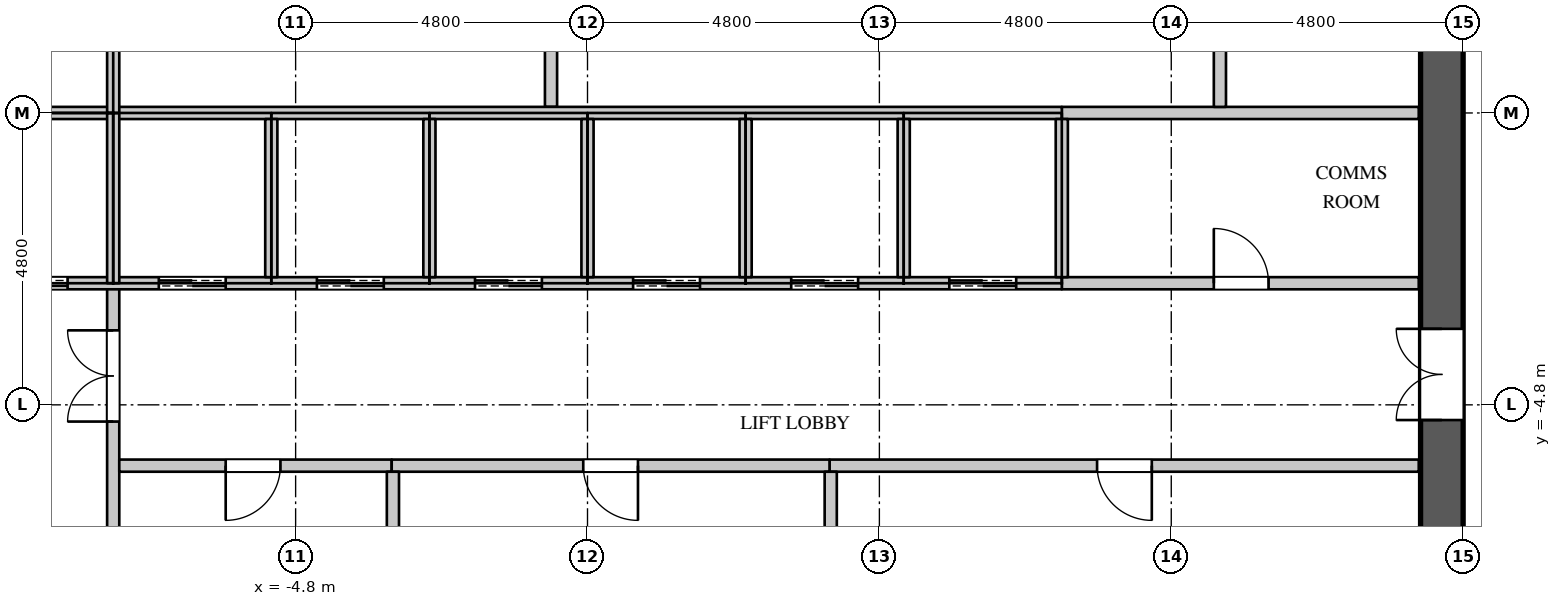
"""IFC4 building model, lengths in metres.
Left out: names, types, materials, properties, quantities, classifications, styles, units other than length and angle.
Written with IfcOpenShell. Run it as: python <this file> out.ifc"""

import sys

from ifc_helpers import new_model, si_unit, direction, frame, frame_2d, origin, place, context, subcontext, project, spatial, rectangle, extrude, element, fill, save


model = new_model("IFC4")
c1 = context("Model", 3, precision=1e-05, world=origin(), true_north=direction((0.0, 1.0)))
c2 = subcontext(c1, "Body", "Model", "MODEL_VIEW")
j1 = project(units=[si_unit("LENGTHUNIT", "METRE"), si_unit("PLANEANGLEUNIT", "RADIAN")], contexts=[c1])
p1 = place(None, origin())
s1 = spatial("IfcSite", under=j1, at=p1, CompositionType="ELEMENT")
p2 = place(p1, origin())
s2 = spatial("IfcBuilding", under=s1, at=p2, CompositionType="ELEMENT")
p3 = place(p2, frame((0.0, 0.0, 200.1)))
s3 = spatial("IfcBuildingStorey", under=s2, at=p3, CompositionType="ELEMENT", Elevation=200.1)
p4 = place(p3, frame((14.05, -11.3, 0.0), z_axis=(0.0, 0.0, 1.0), x_axis=(0.0, 1.0, 0.0)))
e1 = element("IfcWall", 1, at=p4, inside=s3, PredefinedType="SHEAR", context=c2, shape_type="SweptSolid", body=[
    extrude(rectangle(XDim=22.6, YDim=0.7, at=frame_2d((11.3, 0.0))), origin(), (0.0, 0.0, 1.0), 4.2),
])
p5 = place(p4, frame((20.35, 0.0, 0.0)))
e2 = element("IfcOpeningElement", 2, at=p5, cuts=e1, PredefinedType="OPENING", context=c2, shape_type="SweptSolid", body=[
    extrude(rectangle(XDim=1.1, YDim=2.2, at=frame_2d((0.55, 1.1))), frame((0.0, 0.36, 0.0), z_axis=(0.0, -1.0, 0.0), x_axis=(1.0, 0.0, 0.0)), (0.0, 0.0, 1.0), 0.72),
])
p6 = place(p4, frame((1.15, 0.0, 0.0)))
e3 = element("IfcOpeningElement", 3, at=p6, cuts=e1, PredefinedType="OPENING", context=c2, shape_type="SweptSolid", body=[
    extrude(rectangle(XDim=1.1, YDim=2.2, at=frame_2d((0.55, 1.1))), frame((0.0, 0.36, 0.0), z_axis=(0.0, -1.0, 0.0), x_axis=(1.0, 0.0, 0.0)), (0.0, 0.0, 1.0), 0.72),
])
p7 = place(p4, frame((14.85, 0.0, 0.0)))
e4 = element("IfcOpeningElement", 4, at=p7, cuts=e1, PredefinedType="OPENING", context=c2, shape_type="SweptSolid", body=[
    extrude(rectangle(XDim=1.5, YDim=2.4, at=frame_2d((0.75, 1.2))), frame((0.0, 0.36, 0.0), z_axis=(0.0, -1.0, 0.0), x_axis=(1.0, 0.0, 0.0)), (0.0, 0.0, 1.0), 0.72),
])
p8 = place(p4, frame((6.25, 0.0, 0.0)))
e5 = element("IfcOpeningElement", 5, at=p8, cuts=e1, PredefinedType="OPENING", context=c2, shape_type="SweptSolid", body=[
    extrude(rectangle(XDim=1.5, YDim=2.4, at=frame_2d((0.75, 1.2))), frame((0.0, 0.36, 0.0), z_axis=(0.0, -1.0, 0.0), x_axis=(1.0, 0.0, 0.0)), (0.0, 0.0, 1.0), 0.72),
])
p9 = place(p3, frame((-7.8, -8.075, 0.0), z_axis=(0.0, 0.0, 1.0), x_axis=(0.0, 1.0, 0.0)))
e6 = element("IfcWall", 6, at=p9, inside=s3, PredefinedType="PARTITIONING", context=c2, shape_type="SweptSolid", body=[
    extrude(rectangle(XDim=5.275, YDim=0.2, at=frame_2d((2.637, 0.0))), origin(), (0.0, 0.0, 1.0), 3.798),
])
p10 = place(p9, frame((3.0, 0.0, 0.0)))
e7 = element("IfcOpeningElement", 7, at=p10, cuts=e6, PredefinedType="OPENING", context=c2, shape_type="SweptSolid", body=[
    extrude(rectangle(XDim=1.5, YDim=2.4, at=frame_2d((0.75, 1.2))), frame((0.0, 0.11, 0.0), z_axis=(0.0, -1.0, 0.0), x_axis=(1.0, 0.0, 0.0)), (0.0, 0.0, 1.0), 0.22),
])
p11 = place(p3, frame((-7.7, -5.8, 0.0), z_axis=(0.0, 0.0, 1.0), x_axis=(1.0, 0.0, 0.0)))
e8 = element("IfcWall", 8, at=p11, inside=s3, PredefinedType="PARTITIONING", context=c2, shape_type="SweptSolid", body=[
    extrude(rectangle(XDim=4.48, YDim=0.2, at=frame_2d((2.24, 0.0))), origin(), (0.0, 0.0, 1.0), 3.798),
])
p12 = place(p11, frame((1.75, 0.0, 0.0)))
e9 = element("IfcOpeningElement", 9, at=p12, cuts=e8, PredefinedType="OPENING", context=c2, shape_type="SweptSolid", body=[
    extrude(rectangle(XDim=0.9, YDim=2.2, at=frame_2d((0.45, 1.1))), frame((0.0, 0.11, 0.0), z_axis=(0.0, -1.0, 0.0), x_axis=(1.0, 0.0, 0.0)), (0.0, 0.0, 1.0), 0.22),
])
p13 = place(p3, frame((3.98, -5.8, 0.0), z_axis=(0.0, 0.0, 1.0), x_axis=(1.0, 0.0, 0.0)))
e10 = element("IfcWall", 10, at=p13, inside=s3, PredefinedType="PARTITIONING", context=c2, shape_type="SweptSolid", body=[
    extrude(rectangle(XDim=9.69, YDim=0.2, at=frame_2d((4.845, 0.0))), origin(), (0.0, 0.0, 1.0), 3.798),
])
p14 = place(p13, frame((4.4, 0.0, 0.0)))
e11 = element("IfcOpeningElement", 11, at=p14, cuts=e10, PredefinedType="OPENING", context=c2, shape_type="SweptSolid", body=[
    extrude(rectangle(XDim=0.9, YDim=2.2, at=frame_2d((0.45, 1.1))), frame((0.0, 0.11, 0.0), z_axis=(0.0, -1.0, 0.0), x_axis=(1.0, 0.0, 0.0)), (0.0, 0.0, 1.0), 0.22),
])
p15 = place(p3, frame((-3.22, -5.8, 0.0), z_axis=(0.0, 0.0, 1.0), x_axis=(1.0, 0.0, 0.0)))
e12 = element("IfcWall", 12, at=p15, inside=s3, PredefinedType="PARTITIONING", context=c2, shape_type="SweptSolid", body=[
    extrude(rectangle(XDim=7.2, YDim=0.2, at=frame_2d((3.6, 0.0))), origin(), (0.0, 0.0, 1.0), 3.798),
])
p16 = place(p15, frame((3.15, 0.0, 0.0)))
e13 = element("IfcOpeningElement", 13, at=p16, cuts=e12, PredefinedType="OPENING", context=c2, shape_type="SweptSolid", body=[
    extrude(rectangle(XDim=0.9, YDim=2.2, at=frame_2d((0.45, 1.1))), frame((0.0, 0.11, 0.0), z_axis=(0.0, -1.0, 0.0), x_axis=(1.0, 0.0, 0.0)), (0.0, 0.0, 1.0), 0.22),
])
p17 = place(p3, frame((-3.2, -11.27, 0.0), z_axis=(0.0, 0.0, 1.0), x_axis=(0.0, 1.0, 0.0)))
e14 = element("IfcWall", 14, at=p17, inside=s3, PredefinedType="PARTITIONING", context=c2, shape_type="SweptSolid", body=[
    extrude(rectangle(XDim=5.37, YDim=0.2, at=frame_2d((2.685, 0.0))), origin(), (0.0, 0.0, 1.0), 3.798),
])
p18 = place(p3, frame((-0.6, 0.1, 0.0), z_axis=(0.0, 0.0, 1.0), x_axis=(0.0, 1.0, 0.0)))
e15 = element("IfcWall", 15, at=p18, inside=s3, PredefinedType="PARTITIONING", context=c2, shape_type="SweptSolid", body=[
    extrude(rectangle(XDim=2.6, YDim=0.2, at=frame_2d((1.3, 0.0))), origin(), (0.0, 0.0, 1.0), 3.798),
])
p19 = place(p3, frame((4.0, -11.27, 0.0), z_axis=(0.0, 0.0, 1.0), x_axis=(0.0, 1.0, 0.0)))
e16 = element("IfcWall", 16, at=p19, inside=s3, PredefinedType="PARTITIONING", context=c2, shape_type="SweptSolid", body=[
    extrude(rectangle(XDim=5.37, YDim=0.2, at=frame_2d((2.685, 0.0))), origin(), (0.0, 0.0, 1.0), 3.798),
])
p20 = place(p3, frame((7.8, -2.8, 0.0), z_axis=(0.0, 0.0, 1.0), x_axis=(1.0, 0.0, 0.0)))
e17 = element("IfcWall", 17, at=p20, inside=s3, PredefinedType="PARTITIONING", context=c2, shape_type="SweptSolid", body=[
    extrude(rectangle(XDim=5.87, YDim=0.2, at=frame_2d((2.935, 0.0))), origin(), (0.0, 0.0, 1.0), 3.798),
])
p21 = place(p20, frame((2.5, 0.0, 0.0)))
e18 = element("IfcOpeningElement", 18, at=p21, cuts=e17, PredefinedType="OPENING", context=c2, shape_type="SweptSolid", body=[
    extrude(rectangle(XDim=0.9, YDim=2.2, at=frame_2d((0.45, 1.1))), frame((0.0, 0.11, 0.0), z_axis=(0.0, -1.0, 0.0), x_axis=(1.0, 0.0, 0.0)), (0.0, 0.0, 1.0), 0.22),
])
p22 = place(p3, frame((7.8, 0.0, 0.0), z_axis=(0.0, 0.0, 1.0), x_axis=(1.0, 0.0, 0.0)))
e19 = element("IfcWall", 19, at=p22, inside=s3, PredefinedType="PARTITIONING", context=c2, shape_type="SweptSolid", body=[
    extrude(rectangle(XDim=5.87, YDim=0.2, at=frame_2d((2.935, 0.0))), origin(), (0.0, 0.0, 1.0), 3.798),
])
p23 = place(p3, frame((10.4, 0.1, 0.0), z_axis=(0.0, 0.0, 1.0), x_axis=(0.0, 1.0, 0.0)))
e20 = element("IfcWall", 20, at=p23, inside=s3, PredefinedType="PARTITIONING", context=c2, shape_type="SweptSolid", body=[
    extrude(rectangle(XDim=2.6, YDim=0.2, at=frame_2d((1.3, 0.0))), origin(), (0.0, 0.0, 1.0), 3.798),
])
p24 = place(p3, frame((-13.67, 0.0, 0.0), z_axis=(0.0, 0.0, 1.0), x_axis=(1.0, 0.0, 0.0)))
e21 = element("IfcWall", 21, at=p24, inside=s3, PredefinedType="PARTITIONING", context=c2, shape_type="SweptSolid", body=[
    extrude(rectangle(XDim=21.47, YDim=0.2, at=frame_2d((10.735, 0.0))), origin(), (0.0, 0.0, 1.0), 3.798),
])
p25 = place(p3, frame((-10.4, -2.8, 0.0), z_axis=(0.0, 0.0, 1.0), x_axis=(1.0, 0.0, 0.0)))
e22 = element("IfcWall", 22, at=p25, inside=s3, PredefinedType="PARTITIONING", context=c2, shape_type="SweptSolid", body=[
    extrude(rectangle(XDim=18.2, YDim=0.2, at=frame_2d((9.1, 0.0))), origin(), (0.0, 0.0, 1.0), 3.798),
])
p26 = place(p25, frame((0.75, 0.0, 0.0)))
e23 = element("IfcOpeningElement", 23, at=p26, cuts=e22, PredefinedType="OPENING", context=c2, shape_type="SweptSolid", body=[
    extrude(rectangle(XDim=1.1, YDim=2.2, at=frame_2d((0.55, 1.1))), frame((0.0, 0.11, 0.0), z_axis=(0.0, -1.0, 0.0), x_axis=(1.0, 0.0, 0.0)), (0.0, 0.0, 1.0), 0.22),
])
p27 = place(p25, frame((3.35, 0.0, 0.0)))
e24 = element("IfcOpeningElement", 24, at=p27, cuts=e22, PredefinedType="OPENING", context=c2, shape_type="SweptSolid", body=[
    extrude(rectangle(XDim=1.1, YDim=2.2, at=frame_2d((0.55, 1.1))), frame((0.0, 0.11, 0.0), z_axis=(0.0, -1.0, 0.0), x_axis=(1.0, 0.0, 0.0)), (0.0, 0.0, 1.0), 0.22),
])
p28 = place(p25, frame((5.95, 0.0, 0.0)))
e25 = element("IfcOpeningElement", 25, at=p28, cuts=e22, PredefinedType="OPENING", context=c2, shape_type="SweptSolid", body=[
    extrude(rectangle(XDim=1.1, YDim=2.2, at=frame_2d((0.55, 1.1))), frame((0.0, 0.11, 0.0), z_axis=(0.0, -1.0, 0.0), x_axis=(1.0, 0.0, 0.0)), (0.0, 0.0, 1.0), 0.22),
])
p29 = place(p25, frame((8.55, 0.0, 0.0)))
e26 = element("IfcOpeningElement", 26, at=p29, cuts=e22, PredefinedType="OPENING", context=c2, shape_type="SweptSolid", body=[
    extrude(rectangle(XDim=1.1, YDim=2.2, at=frame_2d((0.55, 1.1))), frame((0.0, 0.11, 0.0), z_axis=(0.0, -1.0, 0.0), x_axis=(1.0, 0.0, 0.0)), (0.0, 0.0, 1.0), 0.22),
])
p30 = place(p25, frame((11.15, 0.0, 0.0)))
e27 = element("IfcOpeningElement", 27, at=p30, cuts=e22, PredefinedType="OPENING", context=c2, shape_type="SweptSolid", body=[
    extrude(rectangle(XDim=1.1, YDim=2.2, at=frame_2d((0.55, 1.1))), frame((0.0, 0.11, 0.0), z_axis=(0.0, -1.0, 0.0), x_axis=(1.0, 0.0, 0.0)), (0.0, 0.0, 1.0), 0.22),
])
p31 = place(p25, frame((13.75, 0.0, 0.0)))
e28 = element("IfcOpeningElement", 28, at=p31, cuts=e22, PredefinedType="OPENING", context=c2, shape_type="SweptSolid", body=[
    extrude(rectangle(XDim=1.1, YDim=2.2, at=frame_2d((0.55, 1.1))), frame((0.0, 0.11, 0.0), z_axis=(0.0, -1.0, 0.0), x_axis=(1.0, 0.0, 0.0)), (0.0, 0.0, 1.0), 0.22),
])
p32 = place(p25, frame((16.35, 0.0, 0.0)))
e29 = element("IfcOpeningElement", 29, at=p32, cuts=e22, PredefinedType="OPENING", context=c2, shape_type="SweptSolid", body=[
    extrude(rectangle(XDim=1.1, YDim=2.2, at=frame_2d((0.55, 1.1))), frame((0.0, 0.11, 0.0), z_axis=(0.0, -1.0, 0.0), x_axis=(1.0, 0.0, 0.0)), (0.0, 0.0, 1.0), 0.22),
])
for number, where, z_axis, x_axis in (
    (30, (-7.8, -2.8, 0.0), (0.0, 0.0, 1.0), (0.0, 1.0, 0.0)),
    (31, (-7.8, 0.0, 0.0), (0.0, 0.0, 1.0), (0.0, 1.0, 0.0)),
):
    element("IfcWall", number, at=place(p3, frame(where, z_axis=z_axis, x_axis=x_axis)), inside=s3, PredefinedType="PARTITIONING", context=c2, shape_type="SweptSolid", body=[
        extrude(rectangle(XDim=2.8, YDim=0.2, at=frame_2d((1.4, 0.0))), origin(), (0.0, 0.0, 1.0), 3.798),
    ])
for number, where, z_axis, x_axis in (
    (32, (-5.2, -2.7, 0.0), (0.0, 0.0, 1.0), (0.0, 1.0, 0.0)),
    (33, (-2.6, -2.7, 0.0), (0.0, 0.0, 1.0), (0.0, 1.0, 0.0)),
    (34, (0.0, -2.7, 0.0), (0.0, 0.0, 1.0), (0.0, 1.0, 0.0)),
    (35, (2.6, -2.7, 0.0), (0.0, 0.0, 1.0), (0.0, 1.0, 0.0)),
    (36, (5.2, -2.7, 0.0), (0.0, 0.0, 1.0), (0.0, 1.0, 0.0)),
    (37, (7.8, -2.7, 0.0), (0.0, 0.0, 1.0), (0.0, 1.0, 0.0)),
):
    element("IfcWall", number, at=place(p3, frame(where, z_axis=z_axis, x_axis=x_axis)), inside=s3, PredefinedType="PARTITIONING", context=c2, shape_type="SweptSolid", body=[
        extrude(rectangle(XDim=2.6, YDim=0.2, at=frame_2d((1.3, 0.0))), origin(), (0.0, 0.0, 1.0), 3.798),
    ])
p33 = place(p21, origin())
e38 = element("IfcDoor", 38, at=p33, inside=s3, OperationType="SINGLE_SWING_LEFT", PredefinedType="DOOR", context=c2, shape_type="SweptSolid", body=[
    extrude(rectangle(XDim=0.9, YDim=2.2, at=frame_2d((0.45, 1.1))), frame((0.0, 0.025, 0.0), z_axis=(0.0, -1.0, 0.0), x_axis=(1.0, 0.0, 0.0)), (0.0, 0.0, 1.0), 0.05),
])
fill(e18, e38)
p34 = place(p12, origin())
e39 = element("IfcDoor", 39, at=p34, inside=s3, OperationType="SINGLE_SWING_RIGHT", PredefinedType="DOOR", context=c2, shape_type="SweptSolid", body=[
    extrude(rectangle(XDim=0.9, YDim=2.2, at=frame_2d((0.45, 1.1))), frame((0.0, 0.025, 0.0), z_axis=(0.0, -1.0, 0.0), x_axis=(1.0, 0.0, 0.0)), (0.0, 0.0, 1.0), 0.05),
])
fill(e9, e39)
p35 = place(p16, origin())
e40 = element("IfcDoor", 40, at=p35, inside=s3, OperationType="SINGLE_SWING_LEFT", PredefinedType="DOOR", context=c2, shape_type="SweptSolid", body=[
    extrude(rectangle(XDim=0.9, YDim=2.2, at=frame_2d((0.45, 1.1))), frame((0.0, 0.025, 0.0), z_axis=(0.0, -1.0, 0.0), x_axis=(1.0, 0.0, 0.0)), (0.0, 0.0, 1.0), 0.05),
])
fill(e13, e40)
p36 = place(p14, origin())
e41 = element("IfcDoor", 41, at=p36, inside=s3, OperationType="SINGLE_SWING_LEFT", PredefinedType="DOOR", context=c2, shape_type="SweptSolid", body=[
    extrude(rectangle(XDim=0.9, YDim=2.2, at=frame_2d((0.45, 1.1))), frame((0.0, 0.025, 0.0), z_axis=(0.0, -1.0, 0.0), x_axis=(1.0, 0.0, 0.0)), (0.0, 0.0, 1.0), 0.05),
])
fill(e11, e41)
p37 = place(p26, origin())
e42 = element("IfcDoor", 42, at=p37, inside=s3, OperationType="DOUBLE_DOOR_SLIDING", PredefinedType="DOOR", context=c2, shape_type="SweptSolid", body=[
    extrude(rectangle(XDim=1.1, YDim=2.2, at=frame_2d((0.55, 1.1))), frame((0.0, 0.025, 0.0), z_axis=(0.0, -1.0, 0.0), x_axis=(1.0, 0.0, 0.0)), (0.0, 0.0, 1.0), 0.05),
])
fill(e23, e42)
p38 = place(p27, origin())
e43 = element("IfcDoor", 43, at=p38, inside=s3, OperationType="DOUBLE_DOOR_SLIDING", PredefinedType="DOOR", context=c2, shape_type="SweptSolid", body=[
    extrude(rectangle(XDim=1.1, YDim=2.2, at=frame_2d((0.55, 1.1))), frame((0.0, 0.025, 0.0), z_axis=(0.0, -1.0, 0.0), x_axis=(1.0, 0.0, 0.0)), (0.0, 0.0, 1.0), 0.05),
])
fill(e24, e43)
p39 = place(p28, origin())
e44 = element("IfcDoor", 44, at=p39, inside=s3, OperationType="DOUBLE_DOOR_SLIDING", PredefinedType="DOOR", context=c2, shape_type="SweptSolid", body=[
    extrude(rectangle(XDim=1.1, YDim=2.2, at=frame_2d((0.55, 1.1))), frame((0.0, 0.025, 0.0), z_axis=(0.0, -1.0, 0.0), x_axis=(1.0, 0.0, 0.0)), (0.0, 0.0, 1.0), 0.05),
])
fill(e25, e44)
p40 = place(p29, origin())
e45 = element("IfcDoor", 45, at=p40, inside=s3, OperationType="DOUBLE_DOOR_SLIDING", PredefinedType="DOOR", context=c2, shape_type="SweptSolid", body=[
    extrude(rectangle(XDim=1.1, YDim=2.2, at=frame_2d((0.55, 1.1))), frame((0.0, 0.025, 0.0), z_axis=(0.0, -1.0, 0.0), x_axis=(1.0, 0.0, 0.0)), (0.0, 0.0, 1.0), 0.05),
])
fill(e26, e45)
p41 = place(p30, origin())
e46 = element("IfcDoor", 46, at=p41, inside=s3, OperationType="DOUBLE_DOOR_SLIDING", PredefinedType="DOOR", context=c2, shape_type="SweptSolid", body=[
    extrude(rectangle(XDim=1.1, YDim=2.2, at=frame_2d((0.55, 1.1))), frame((0.0, 0.025, 0.0), z_axis=(0.0, -1.0, 0.0), x_axis=(1.0, 0.0, 0.0)), (0.0, 0.0, 1.0), 0.05),
])
fill(e27, e46)
p42 = place(p31, origin())
e47 = element("IfcDoor", 47, at=p42, inside=s3, OperationType="DOUBLE_DOOR_SLIDING", PredefinedType="DOOR", context=c2, shape_type="SweptSolid", body=[
    extrude(rectangle(XDim=1.1, YDim=2.2, at=frame_2d((0.55, 1.1))), frame((0.0, 0.025, 0.0), z_axis=(0.0, -1.0, 0.0), x_axis=(1.0, 0.0, 0.0)), (0.0, 0.0, 1.0), 0.05),
])
fill(e28, e47)
p43 = place(p32, origin())
e48 = element("IfcDoor", 48, at=p43, inside=s3, OperationType="DOUBLE_DOOR_SLIDING", PredefinedType="DOOR", context=c2, shape_type="SweptSolid", body=[
    extrude(rectangle(XDim=1.1, YDim=2.2, at=frame_2d((0.55, 1.1))), frame((0.0, 0.025, 0.0), z_axis=(0.0, -1.0, 0.0), x_axis=(1.0, 0.0, 0.0)), (0.0, 0.0, 1.0), 0.05),
])
fill(e29, e48)
p44 = place(p10, origin())
e49 = element("IfcDoor", 49, at=p44, inside=s3, OperationType="DOUBLE_DOOR_SINGLE_SWING", PredefinedType="DOOR", context=c2, shape_type="SweptSolid", body=[
    extrude(rectangle(XDim=1.5, YDim=2.4, at=frame_2d((0.75, 1.2))), frame((0.0, 0.025, 0.0), z_axis=(0.0, -1.0, 0.0), x_axis=(1.0, 0.0, 0.0)), (0.0, 0.0, 1.0), 0.05),
])
fill(e7, e49)
p45 = place(p8, origin())
e50 = element("IfcDoor", 50, at=p45, inside=s3, OperationType="DOUBLE_DOOR_SINGLE_SWING", PredefinedType="DOOR", context=c2, shape_type="SweptSolid", body=[
    extrude(rectangle(XDim=1.5, YDim=2.4, at=frame_2d((0.75, 1.2))), frame((0.0, 0.345, 0.0), z_axis=(0.0, -1.0, 0.0), x_axis=(1.0, 0.0, 0.0)), (0.0, 0.0, 1.0), 0.05),
])
fill(e5, e50)
save(model, sys.argv[1])
